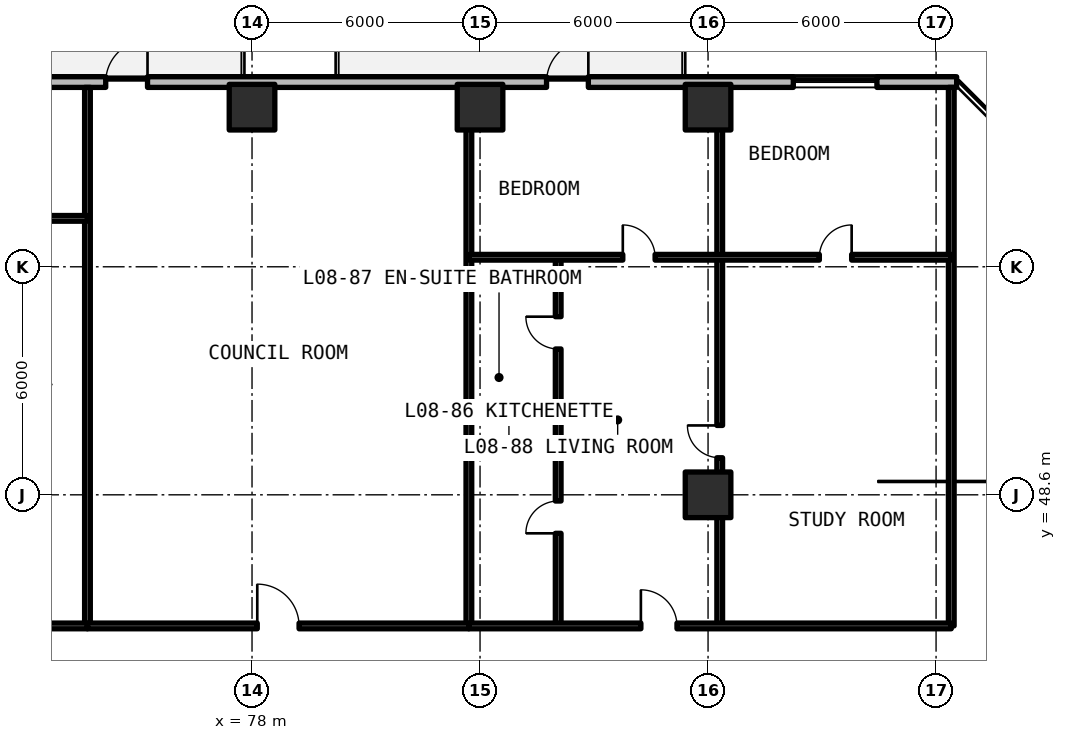
"""IFC4 building model, lengths in metres.
Left out: names, types, materials, properties, quantities, classifications, styles, units other than length and angle.
Written with IfcOpenShell. Run it as: python <this file> out.ifc"""

import sys

from ifc_helpers import new_model, si_unit, direction, frame, frame_2d, origin, origin_2d, place, context, subcontext, project, spatial, rectangle, extrude, element, fill, save


model = new_model("IFC4")
c1 = context("Model", 3, precision=1e-05, world=origin(), true_north=direction((0.0, 1.0)))
c2 = subcontext(c1, "Body", "Model", "MODEL_VIEW")
j1 = project(units=[si_unit("LENGTHUNIT", "METRE"), si_unit("PLANEANGLEUNIT", "RADIAN")], contexts=[c1])
p1 = place(None, origin())
s1 = spatial("IfcSite", under=j1, at=p1, CompositionType="ELEMENT")
p2 = place(p1, origin())
s2 = spatial("IfcBuilding", under=s1, at=p2, CompositionType="ELEMENT")
p3 = place(p2, frame((0.0, 0.0, 32.34)))
s3 = spatial("IfcBuildingStorey", under=s2, at=p3, CompositionType="ELEMENT", Elevation=32.34)
for number, where, z_axis, x_axis in (
    (1, (90.0, 48.6, 0.0), (0.0, 0.0, 1.0), (1.0, 0.0, 0.0)),
    (2, (78.0, 58.8, 0.0), (0.0, 0.0, 1.0), (1.0, 0.0, 0.0)),
    (3, (84.0, 58.8, 0.0), (0.0, 0.0, 1.0), (1.0, 0.0, 0.0)),
    (4, (90.0, 58.8, 0.0), (0.0, 0.0, 1.0), (1.0, 0.0, 0.0)),
):
    element("IfcColumn", number, at=place(p3, frame(where, z_axis=z_axis, x_axis=x_axis)), inside=s3, PredefinedType="COLUMN", context=c2, shape_type="SweptSolid", body=[
        extrude(rectangle(XDim=1.2, YDim=1.2, at=origin_2d()), origin(), (0.0, 0.0, 1.0), 3.3),
    ])
p4 = place(p3, frame((96.542, 59.46, 0.0), z_axis=(0.0, 0.0, 1.0), x_axis=(-1.0, 0.0, 0.0)))
e5 = element("IfcWall", 5, at=p4, inside=s3, PredefinedType="SOLIDWALL", context=c2, shape_type="SweptSolid", body=[
    extrude(rectangle(XDim=44.402, YDim=0.28, at=frame_2d((22.201, 0.0))), origin(), (0.0, 0.0, 1.0), 3.08),
])
p5 = place(p4, frame((33.642, 0.0, 0.0)))
e6 = element("IfcOpeningElement", 6, at=p5, cuts=e5, PredefinedType="OPENING", context=c2, shape_type="SweptSolid", body=[
    extrude(rectangle(XDim=1.1, YDim=2.15, at=frame_2d((0.55, 1.075))), frame((0.0, 0.15, 0.0), z_axis=(0.0, -1.0, 0.0), x_axis=(1.0, 0.0, 0.0)), (0.0, 0.0, 1.0), 0.3),
])
p6 = place(p4, frame((21.292, 0.0, 0.0)))
e7 = element("IfcOpeningElement", 7, at=p6, cuts=e5, PredefinedType="OPENING", context=c2, shape_type="SweptSolid", body=[
    extrude(rectangle(XDim=1.1, YDim=2.15, at=frame_2d((0.55, 1.075))), frame((0.0, 0.15, 0.0), z_axis=(0.0, -1.0, 0.0), x_axis=(1.0, 0.0, 0.0)), (0.0, 0.0, 1.0), 0.3),
])
p7 = place(p4, frame((9.692, 0.0, 0.0)))
e8 = element("IfcOpeningElement", 8, at=p7, cuts=e5, PredefinedType="OPENING", context=c2, shape_type="SweptSolid", body=[
    extrude(rectangle(XDim=1.1, YDim=2.15, at=frame_2d((0.55, 1.075))), frame((0.0, 0.15, 0.0), z_axis=(0.0, -1.0, 0.0), x_axis=(1.0, 0.0, 0.0)), (0.0, 0.0, 1.0), 0.3),
])
p8 = place(p4, frame((39.455, 0.0, 0.78)))
e9 = element("IfcOpeningElement", 9, at=p8, cuts=e5, PredefinedType="OPENING", context=c2, shape_type="SweptSolid", body=[
    extrude(rectangle(XDim=2.2, YDim=1.66, at=frame_2d((1.1, 0.83))), frame((0.0, 0.15, 0.0), z_axis=(0.0, -1.0, 0.0), x_axis=(1.0, 0.0, 0.0)), (0.0, 0.0, 1.0), 0.3),
])
p9 = place(p4, frame((26.053, 0.0, 0.78)))
e10 = element("IfcOpeningElement", 10, at=p9, cuts=e5, PredefinedType="OPENING", context=c2, shape_type="SweptSolid", body=[
    extrude(rectangle(XDim=2.2, YDim=1.66, at=frame_2d((1.1, 0.83))), frame((0.0, 0.15, 0.0), z_axis=(0.0, -1.0, 0.0), x_axis=(1.0, 0.0, 0.0)), (0.0, 0.0, 1.0), 0.3),
])
p10 = place(p4, frame((2.098, 0.0, 0.78)))
e11 = element("IfcOpeningElement", 11, at=p10, cuts=e5, PredefinedType="OPENING", context=c2, shape_type="SweptSolid", body=[
    extrude(rectangle(XDim=2.2, YDim=1.66, at=frame_2d((1.1, 0.83))), frame((0.0, 0.15, 0.0), z_axis=(0.0, -1.0, 0.0), x_axis=(1.0, 0.0, 0.0)), (0.0, 0.0, 1.0), 0.3),
])
for number, where, z_axis, x_axis in (
    (12, (96.4, 45.15, 0.0), (0.0, 0.0, 1.0), (0.0, 1.0, 0.0)),
    (13, (73.67, 45.15, 0.0), (0.0, 0.0, 1.0), (0.0, 1.0, 0.0)),
):
    element("IfcWall", number, at=place(p3, frame(where, z_axis=z_axis, x_axis=x_axis)), inside=s3, PredefinedType="SOLIDWALL", context=c2, shape_type="SweptSolid", body=[
        extrude(rectangle(XDim=14.17, YDim=0.15, at=frame_2d((7.085, 0.0))), origin(), (0.0, 0.0, 1.0), 2.35),
    ])
p11 = place(p3, frame((65.109, 55.874, 0.0), z_axis=(0.0, 0.0, 1.0), x_axis=(1.0, 0.0, 0.0)))
e14 = element("IfcWall", 14, at=p11, inside=s3, PredefinedType="PARTITIONING", context=c2, shape_type="SweptSolid", body=[
    extrude(rectangle(XDim=8.561, YDim=0.15, at=frame_2d((4.28, 0.0))), origin(), (0.0, 0.0, 1.0), 2.35),
])
p12 = place(p11, frame((5.301, 0.0, 0.0)))
e15 = element("IfcOpeningElement", 15, at=p12, cuts=e14, PredefinedType="OPENING", context=c2, shape_type="SweptSolid", body=[
    extrude(rectangle(XDim=0.85, YDim=2.1, at=frame_2d((0.425, 1.05))), frame((0.0, 0.085, 0.0), z_axis=(0.0, -1.0, 0.0), x_axis=(1.0, 0.0, 0.0)), (0.0, 0.0, 1.0), 0.17),
])
p13 = place(p3, frame((65.109, 45.15, 0.0), z_axis=(0.0, 0.0, 1.0), x_axis=(1.0, 0.0, 0.0)))
e16 = element("IfcWall", 16, at=p13, inside=s3, PredefinedType="SOLIDWALL", context=c2, shape_type="SweptSolid", body=[
    extrude(rectangle(XDim=8.561, YDim=0.15, at=frame_2d((4.28, 0.0))), origin(), (0.0, 0.0, 1.0), 2.35),
])
p14 = place(p13, frame((5.251, 0.0, 0.0)))
e17 = element("IfcOpeningElement", 17, at=p14, cuts=e16, PredefinedType="OPENING", context=c2, shape_type="SweptSolid", body=[
    extrude(rectangle(XDim=0.95, YDim=2.15, at=frame_2d((0.475, 1.075))), frame((0.0, 0.085, 0.0), z_axis=(0.0, -1.0, 0.0), x_axis=(1.0, 0.0, 0.0)), (0.0, 0.0, 1.0), 0.17),
])
p15 = place(p3, frame((83.706, 45.15, 0.0), z_axis=(0.0, 0.0, 1.0), x_axis=(0.0, 1.0, 0.0)))
e18 = element("IfcWall", 18, at=p15, inside=s3, PredefinedType="SOLIDWALL", context=c2, shape_type="SweptSolid", body=[
    extrude(rectangle(XDim=14.17, YDim=0.15, at=frame_2d((7.085, 0.0))), origin(), (0.0, 0.0, 1.0), 2.35),
])
p16 = place(p3, frame((73.67, 45.15, 0.0), z_axis=(0.0, 0.0, 1.0), x_axis=(1.0, 0.0, 0.0)))
e19 = element("IfcWall", 19, at=p16, inside=s3, PredefinedType="SOLIDWALL", context=c2, shape_type="SweptSolid", body=[
    extrude(rectangle(XDim=10.037, YDim=0.15, at=frame_2d((5.018, 0.0))), origin(), (0.0, 0.0, 1.0), 2.35),
])
p17 = place(p16, frame((4.469, 0.0, 0.0)))
e20 = element("IfcOpeningElement", 20, at=p17, cuts=e19, PredefinedType="OPENING", context=c2, shape_type="SweptSolid", body=[
    extrude(rectangle(XDim=1.1, YDim=2.15, at=frame_2d((0.55, 1.075))), frame((0.0, 0.085, 0.0), z_axis=(0.0, -1.0, 0.0), x_axis=(1.0, 0.0, 0.0)), (0.0, 0.0, 1.0), 0.17),
])
p18 = place(p3, frame((90.307, 45.15, 0.0), z_axis=(0.0, 0.0, 1.0), x_axis=(0.0, 1.0, 0.0)))
e21 = element("IfcWall", 21, at=p18, inside=s3, PredefinedType="PARTITIONING", context=c2, shape_type="SweptSolid", body=[
    extrude(rectangle(XDim=9.701, YDim=0.15, at=frame_2d((4.851, 0.0))), origin(), (0.0, 0.0, 1.0), 2.35),
])
p19 = place(p18, frame((4.425, 0.0, 0.0)))
e22 = element("IfcOpeningElement", 22, at=p19, cuts=e21, PredefinedType="OPENING", context=c2, shape_type="SweptSolid", body=[
    extrude(rectangle(XDim=0.85, YDim=2.1, at=frame_2d((0.425, 1.05))), frame((0.0, 0.085, 0.0), z_axis=(0.0, -1.0, 0.0), x_axis=(1.0, 0.0, 0.0)), (0.0, 0.0, 1.0), 0.17),
])
p20 = place(p3, frame((83.706, 50.874, 0.0), z_axis=(0.0, 0.0, 1.0), x_axis=(1.0, 0.0, 0.0)))
e23 = element("IfcWall", 23, at=p20, inside=s3, PredefinedType="PARTITIONING", context=c2, shape_type="SweptSolid", body=[
    extrude(rectangle(XDim=2.35, YDim=0.15, at=frame_2d((1.175, 0.0))), origin(), (0.0, 0.0, 1.0), 2.35),
])
p21 = place(p3, frame((86.056, 45.15, 0.0), z_axis=(0.0, 0.0, 1.0), x_axis=(0.0, 1.0, 0.0)))
e24 = element("IfcWall", 24, at=p21, inside=s3, PredefinedType="PARTITIONING", context=c2, shape_type="SweptSolid", body=[
    extrude(rectangle(XDim=9.701, YDim=0.15, at=frame_2d((4.851, 0.0))), origin(), (0.0, 0.0, 1.0), 2.35),
])
p22 = place(p21, frame((2.437, 0.0, 0.0)))
e25 = element("IfcOpeningElement", 25, at=p22, cuts=e24, PredefinedType="OPENING", context=c2, shape_type="SweptSolid", body=[
    extrude(rectangle(XDim=0.85, YDim=2.1, at=frame_2d((0.425, 1.05))), frame((0.0, 0.085, 0.0), z_axis=(0.0, -1.0, 0.0), x_axis=(1.0, 0.0, 0.0)), (0.0, 0.0, 1.0), 0.17),
])
p23 = place(p21, frame((7.287, 0.0, 0.0)))
e26 = element("IfcOpeningElement", 26, at=p23, cuts=e24, PredefinedType="OPENING", context=c2, shape_type="SweptSolid", body=[
    extrude(rectangle(XDim=0.85, YDim=2.1, at=frame_2d((0.425, 1.05))), frame((0.0, 0.085, 0.0), z_axis=(0.0, -1.0, 0.0), x_axis=(1.0, 0.0, 0.0)), (0.0, 0.0, 1.0), 0.17),
])
p24 = place(p3, frame((90.307, 54.851, 0.0), z_axis=(0.0, 0.0, 1.0), x_axis=(0.0, 1.0, 0.0)))
e27 = element("IfcWall", 27, at=p24, inside=s3, PredefinedType="PARTITIONING", context=c2, shape_type="SweptSolid", body=[
    extrude(rectangle(XDim=4.469, YDim=0.15, at=frame_2d((2.235, 0.0))), origin(), (0.0, 0.0, 1.0), 2.35),
])
p25 = place(p3, frame((83.706, 54.851, 0.0), z_axis=(0.0, 0.0, 1.0), x_axis=(1.0, 0.0, 0.0)))
e28 = element("IfcWall", 28, at=p25, inside=s3, PredefinedType="PARTITIONING", context=c2, shape_type="SweptSolid", body=[
    extrude(rectangle(XDim=12.694, YDim=0.15, at=frame_2d((6.347, 0.0))), origin(), (0.0, 0.0, 1.0), 2.35),
])
p26 = place(p25, frame((4.05, 0.0, 0.0)))
e29 = element("IfcOpeningElement", 29, at=p26, cuts=e28, PredefinedType="OPENING", context=c2, shape_type="SweptSolid", body=[
    extrude(rectangle(XDim=0.85, YDim=2.1, at=frame_2d((0.425, 1.05))), frame((0.0, 0.085, 0.0), z_axis=(0.0, -1.0, 0.0), x_axis=(1.0, 0.0, 0.0)), (0.0, 0.0, 1.0), 0.17),
])
p27 = place(p25, frame((9.222, 0.0, 0.0)))
e30 = element("IfcOpeningElement", 30, at=p27, cuts=e28, PredefinedType="OPENING", context=c2, shape_type="SweptSolid", body=[
    extrude(rectangle(XDim=0.85, YDim=2.1, at=frame_2d((0.425, 1.05))), frame((0.0, 0.085, 0.0), z_axis=(0.0, -1.0, 0.0), x_axis=(1.0, 0.0, 0.0)), (0.0, 0.0, 1.0), 0.17),
])
p28 = place(p3, frame((83.706, 45.15, 0.0), z_axis=(0.0, 0.0, 1.0), x_axis=(1.0, 0.0, 0.0)))
e31 = element("IfcWall", 31, at=p28, inside=s3, PredefinedType="SOLIDWALL", context=c2, shape_type="SweptSolid", body=[
    extrude(rectangle(XDim=12.694, YDim=0.15, at=frame_2d((6.347, 0.0))), origin(), (0.0, 0.0, 1.0), 2.35),
])
p29 = place(p28, frame((4.526, 0.0, 0.0)))
e32 = element("IfcOpeningElement", 32, at=p29, cuts=e31, PredefinedType="OPENING", context=c2, shape_type="SweptSolid", body=[
    extrude(rectangle(XDim=0.95, YDim=2.15, at=frame_2d((0.475, 1.075))), frame((0.0, 0.085, 0.0), z_axis=(0.0, -1.0, 0.0), x_axis=(1.0, 0.0, 0.0)), (0.0, 0.0, 1.0), 0.17),
])
p30 = place(p6, frame((1.1, 0.0, 0.0), z_axis=(0.0, 0.0, 1.0), x_axis=(-1.0, 0.0, 0.0)))
e33 = element("IfcDoor", 33, at=p30, inside=s3, OperationType="SINGLE_SWING_RIGHT", PredefinedType="DOOR", context=c2, shape_type="SweptSolid", body=[
    extrude(rectangle(XDim=1.1, YDim=2.15, at=frame_2d((0.55, 1.075))), frame((0.0, 0.025, 0.0), z_axis=(0.0, -1.0, 0.0), x_axis=(1.0, 0.0, 0.0)), (0.0, 0.0, 1.0), 0.05),
])
fill(e7, e33)
p31 = place(p7, frame((1.1, 0.0, 0.0), z_axis=(0.0, 0.0, 1.0), x_axis=(-1.0, 0.0, 0.0)))
e34 = element("IfcDoor", 34, at=p31, inside=s3, OperationType="SINGLE_SWING_LEFT", PredefinedType="DOOR", context=c2, shape_type="SweptSolid", body=[
    extrude(rectangle(XDim=1.1, YDim=2.15, at=frame_2d((0.55, 1.075))), frame((0.0, 0.025, 0.0), z_axis=(0.0, -1.0, 0.0), x_axis=(1.0, 0.0, 0.0)), (0.0, 0.0, 1.0), 0.05),
])
fill(e8, e34)
p32 = place(p10, origin())
e35 = element("IfcWindow", 35, at=p32, inside=s3, PartitioningType="SINGLE_PANEL", PredefinedType="WINDOW", context=c2, shape_type="SweptSolid", body=[
    extrude(rectangle(XDim=2.2, YDim=1.66, at=frame_2d((1.1, 0.83))), frame((0.0, 0.03, 0.0), z_axis=(0.0, -1.0, 0.0), x_axis=(1.0, 0.0, 0.0)), (0.0, 0.0, 1.0), 0.06),
])
fill(e11, e35)
p33 = place(p17, origin())
e36 = element("IfcDoor", 36, at=p33, inside=s3, OperationType="SINGLE_SWING_LEFT", PredefinedType="DOOR", context=c2, shape_type="SweptSolid", body=[
    extrude(rectangle(XDim=1.1, YDim=2.15, at=frame_2d((0.55, 1.075))), frame((0.0, 0.025, 0.0), z_axis=(0.0, -1.0, 0.0), x_axis=(1.0, 0.0, 0.0)), (0.0, 0.0, 1.0), 0.05),
])
fill(e20, e36)
p34 = place(p19, origin())
e37 = element("IfcDoor", 37, at=p34, inside=s3, OperationType="SINGLE_SWING_RIGHT", PredefinedType="DOOR", context=c2, shape_type="SweptSolid", body=[
    extrude(rectangle(XDim=0.85, YDim=2.1, at=frame_2d((0.425, 1.05))), frame((0.0, 0.025, 0.0), z_axis=(0.0, -1.0, 0.0), x_axis=(1.0, 0.0, 0.0)), (0.0, 0.0, 1.0), 0.05),
])
fill(e22, e37)
p35 = place(p22, origin())
e38 = element("IfcDoor", 38, at=p35, inside=s3, OperationType="SINGLE_SWING_LEFT", PredefinedType="DOOR", context=c2, shape_type="SweptSolid", body=[
    extrude(rectangle(XDim=0.85, YDim=2.1, at=frame_2d((0.425, 1.05))), frame((0.0, 0.025, 0.0), z_axis=(0.0, -1.0, 0.0), x_axis=(1.0, 0.0, 0.0)), (0.0, 0.0, 1.0), 0.05),
])
fill(e25, e38)
p36 = place(p23, origin())
e39 = element("IfcDoor", 39, at=p36, inside=s3, OperationType="SINGLE_SWING_RIGHT", PredefinedType="DOOR", context=c2, shape_type="SweptSolid", body=[
    extrude(rectangle(XDim=0.85, YDim=2.1, at=frame_2d((0.425, 1.05))), frame((0.0, 0.025, 0.0), z_axis=(0.0, -1.0, 0.0), x_axis=(1.0, 0.0, 0.0)), (0.0, 0.0, 1.0), 0.05),
])
fill(e26, e39)
p37 = place(p26, origin())
e40 = element("IfcDoor", 40, at=p37, inside=s3, OperationType="SINGLE_SWING_LEFT", PredefinedType="DOOR", context=c2, shape_type="SweptSolid", body=[
    extrude(rectangle(XDim=0.85, YDim=2.1, at=frame_2d((0.425, 1.05))), frame((0.0, 0.025, 0.0), z_axis=(0.0, -1.0, 0.0), x_axis=(1.0, 0.0, 0.0)), (0.0, 0.0, 1.0), 0.05),
])
fill(e29, e40)
p38 = place(p27, origin())
e41 = element("IfcDoor", 41, at=p38, inside=s3, OperationType="SINGLE_SWING_RIGHT", PredefinedType="DOOR", context=c2, shape_type="SweptSolid", body=[
    extrude(rectangle(XDim=0.85, YDim=2.1, at=frame_2d((0.425, 1.05))), frame((0.0, 0.025, 0.0), z_axis=(0.0, -1.0, 0.0), x_axis=(1.0, 0.0, 0.0)), (0.0, 0.0, 1.0), 0.05),
])
fill(e30, e41)
p39 = place(p29, origin())
e42 = element("IfcDoor", 42, at=p39, inside=s3, OperationType="SINGLE_SWING_LEFT", PredefinedType="DOOR", context=c2, shape_type="SweptSolid", body=[
    extrude(rectangle(XDim=0.95, YDim=2.15, at=frame_2d((0.475, 1.075))), frame((0.0, 0.025, 0.0), z_axis=(0.0, -1.0, 0.0), x_axis=(1.0, 0.0, 0.0)), (0.0, 0.0, 1.0), 0.05),
])
fill(e32, e42)
save(model, sys.argv[1])
